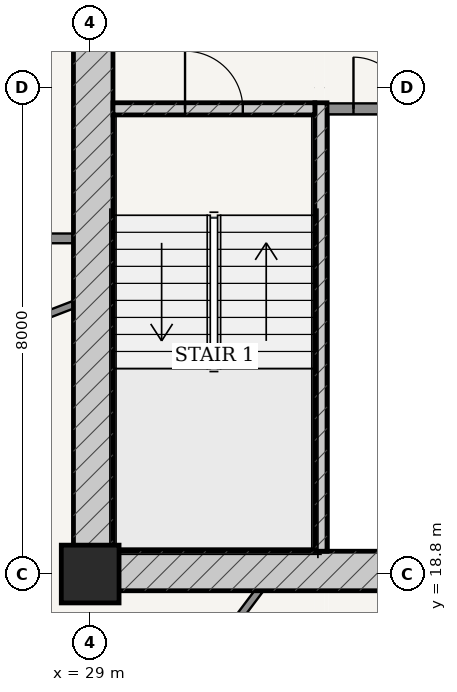
"""IFC4 building model, lengths in metres.
Left out: names, types, materials, properties, quantities, classifications, styles, units other than length and angle.
Written with IfcOpenShell. Run it as: python <this file> out.ifc"""

import sys

from ifc_helpers import new_model, si_unit, direction, frame, frame_2d, origin, origin_2d, place, context, subcontext, project, spatial, rectangle, extrude, source, transform, mapped, element, fill, save


model = new_model("IFC4")
c1 = context("Model", 3, precision=1e-05, world=origin(), true_north=direction((-0.2419218956, 0.970295726276)))
c2 = subcontext(c1, "Body", "Model", "MODEL_VIEW")
j1 = project(units=[si_unit("LENGTHUNIT", "METRE"), si_unit("PLANEANGLEUNIT", "RADIAN")], contexts=[c1])
p1 = place(None, origin())
s1 = spatial("IfcSite", under=j1, at=p1, CompositionType="ELEMENT")
p2 = place(p1, origin())
s2 = spatial("IfcBuilding", under=s1, at=p2, CompositionType="ELEMENT")
p3 = place(p2, frame((0.0, 0.0, 182.2)))
s3 = spatial("IfcBuildingStorey", under=s2, at=p3, CompositionType="ELEMENT", Elevation=182.2)
p4 = place(p3, frame((29.0, 18.8, 0.0), z_axis=(0.0, 0.0, 1.0), x_axis=(1.0, 0.0, 0.0)))
e1 = element("IfcColumn", 1, at=p4, inside=s3, PredefinedType="COLUMN", context=c2, shape_type="SweptSolid", body=[
    extrude(rectangle(XDim=0.95, YDim=0.95, at=origin_2d()), origin(), (0.0, 0.0, 1.0), 3.6),
])
p5 = place(p3, frame((28.725, 18.85, 0.0), z_axis=(0.0, 0.0, 1.0), x_axis=(1.0, 0.0, 0.0)))
e2 = element("IfcWall", 2, at=p5, inside=s3, PredefinedType="SHEAR", context=c2, shape_type="SweptSolid", body=[
    extrude(rectangle(XDim=18.55, YDim=0.65, at=frame_2d((9.275, 0.0))), origin(), (0.0, 0.0, 1.0), 3.15),
])
p6 = place(p5, frame((7.51, 0.0, 0.0)))
e3 = element("IfcOpeningElement", 3, at=p6, cuts=e2, PredefinedType="OPENING", context=c2, shape_type="SweptSolid", body=[
    extrude(rectangle(XDim=0.85, YDim=2.1, at=frame_2d((0.425, 1.05))), frame((0.0, 0.335, 0.0), z_axis=(0.0, -1.0, 0.0), x_axis=(1.0, 0.0, 0.0)), (0.0, 0.0, 1.0), 0.67),
])
p7 = place(p5, frame((10.59, 0.0, 0.0)))
e4 = element("IfcOpeningElement", 4, at=p7, cuts=e2, PredefinedType="OPENING", context=c2, shape_type="SweptSolid", body=[
    extrude(rectangle(XDim=0.85, YDim=2.1, at=frame_2d((0.425, 1.05))), frame((0.0, 0.335, 0.0), z_axis=(0.0, -1.0, 0.0), x_axis=(1.0, 0.0, 0.0)), (0.0, 0.0, 1.0), 0.67),
])
p8 = place(p3, frame((29.05, 19.175, 0.0), z_axis=(0.0, 0.0, 1.0), x_axis=(0.0, 1.0, 0.0)))
e5 = element("IfcWall", 5, at=p8, inside=s3, PredefinedType="SHEAR", context=c2, shape_type="SweptSolid", body=[
    extrude(rectangle(XDim=15.25, YDim=0.65, at=frame_2d((7.625, 0.0))), origin(), (0.0, 0.0, 1.0), 3.15),
])
p9 = place(p8, frame((9.875, 0.0, 0.0)))
e6 = element("IfcOpeningElement", 6, at=p9, cuts=e5, PredefinedType="OPENING", context=c2, shape_type="SweptSolid", body=[
    extrude(rectangle(XDim=1.5, YDim=2.2, at=frame_2d((0.75, 1.1))), frame((0.0, 0.335, 0.0), z_axis=(0.0, -1.0, 0.0), x_axis=(1.0, 0.0, 0.0)), (0.0, 0.0, 1.0), 0.67),
])
p10 = place(p3, frame((32.795, 19.175, 0.0), z_axis=(0.0, 0.0, 1.0), x_axis=(0.0, 1.0, 0.0)))
e7 = element("IfcWall", 7, at=p10, inside=s3, PredefinedType="SOLIDWALL", context=c2, shape_type="SweptSolid", body=[
    extrude(rectangle(XDim=7.375, YDim=0.2, at=frame_2d((3.688, 0.0))), origin(), (0.0, 0.0, 1.0), 3.15),
])
p11 = place(p3, frame((29.375, 26.45, 0.0), z_axis=(0.0, 0.0, 1.0), x_axis=(1.0, 0.0, 0.0)))
e8 = element("IfcWall", 8, at=p11, inside=s3, PredefinedType="SOLIDWALL", context=c2, shape_type="SweptSolid", body=[
    extrude(rectangle(XDim=3.32, YDim=0.2, at=frame_2d((1.66, 0.0))), origin(), (0.0, 0.0, 1.0), 3.15),
])
p12 = place(p11, frame((1.185, 0.0, 0.0)))
e9 = element("IfcOpeningElement", 9, at=p12, cuts=e8, PredefinedType="OPENING", context=c2, shape_type="SweptSolid", body=[
    extrude(rectangle(XDim=0.95, YDim=2.15, at=frame_2d((0.475, 1.075))), frame((0.0, 0.11, 0.0), z_axis=(0.0, -1.0, 0.0), x_axis=(1.0, 0.0, 0.0)), (0.0, 0.0, 1.0), 0.22),
])
p13 = place(p3, frame((32.9, 26.45, 0.0), z_axis=(0.0, 0.0, 1.0), x_axis=(1.0, 0.0, 0.0)))
e10 = element("IfcWall", 10, at=p13, inside=s3, PredefinedType="PARTITIONING", context=c2, shape_type="SweptSolid", body=[
    extrude(rectangle(XDim=1.71, YDim=0.18, at=frame_2d((0.855, 0.0))), origin(), (0.0, 0.0, 1.0), 3.15),
])
p14 = place(p13, frame((0.43, 0.0, 0.0)))
e11 = element("IfcOpeningElement", 11, at=p14, cuts=e10, PredefinedType="OPENING", context=c2, shape_type="SweptSolid", body=[
    extrude(rectangle(XDim=0.85, YDim=2.1, at=frame_2d((0.425, 1.05))), frame((0.0, 0.1, 0.0), z_axis=(0.0, -1.0, 0.0), x_axis=(1.0, 0.0, 0.0)), (0.0, 0.0, 1.0), 0.2),
])
p15 = place(p3, frame((26.795, 24.32, 0.0), z_axis=(0.0, 0.0, 1.0), x_axis=(1.0, 0.0, 0.0)))
e12 = element("IfcWall", 12, at=p15, inside=s3, PredefinedType="PARTITIONING", context=c2, shape_type="SweptSolid", body=[
    extrude(rectangle(XDim=1.93, YDim=0.16, at=frame_2d((0.965, 0.0))), origin(), (0.0, 0.0, 1.0), 3.15),
])
p16 = place(p3, frame((28.723, 23.229, 0.0), z_axis=(0.0, 0.0, 1.0), x_axis=(-0.933262385607, -0.359195378048, 0.0)))
e13 = element("IfcWall", 13, at=p16, inside=s3, PredefinedType="PARTITIONING", context=c2, shape_type="SweptSolid", body=[
    extrude(rectangle(XDim=5.219, YDim=0.12, at=frame_2d((2.609, 0.0))), origin(), (0.0, 0.0, 1.0), 2.825),
])
p17 = place(p16, frame((2.179, 0.0, 0.0)))
e14 = element("IfcOpeningElement", 14, at=p17, cuts=e13, PredefinedType="OPENING", context=c2, shape_type="SweptSolid", body=[
    extrude(rectangle(XDim=0.86, YDim=2.15, at=frame_2d((0.43, 1.075))), frame((0.0, 0.07, 0.0), z_axis=(0.0, -1.0, 0.0), x_axis=(1.0, 0.0, 0.0)), (0.0, 0.0, 1.0), 0.14),
])
p18 = place(p3, frame((31.777, 18.525, 0.0), z_axis=(0.0, 0.0, 1.0), x_axis=(-0.601054484551, -0.799208049635, 0.0)))
e15 = element("IfcWall", 15, at=p18, inside=s3, PredefinedType="PARTITIONING", context=c2, shape_type="SweptSolid", body=[
    extrude(rectangle(XDim=3.592, YDim=0.12, at=frame_2d((1.796, 0.0))), origin(), (0.0, 0.0, 1.0), 3.15),
])
p19 = place(p18, frame((1.346, 0.0, 0.0)))
e16 = element("IfcOpeningElement", 16, at=p19, cuts=e15, PredefinedType="OPENING", context=c2, shape_type="SweptSolid", body=[
    extrude(rectangle(XDim=0.9, YDim=2.15, at=frame_2d((0.45, 1.075))), frame((0.0, 0.07, 0.0), z_axis=(0.0, -1.0, 0.0), x_axis=(1.0, 0.0, 0.0)), (0.0, 0.0, 1.0), 0.14),
])
m1 = source(origin(), c2, "Body", "SweptSolid", [
    extrude(rectangle(XDim=0.95, YDim=2.15, at=frame_2d((0.475, 1.075))), frame((0.0, 0.025, 0.0), z_axis=(0.0, -1.0, 0.0), x_axis=(1.0, 0.0, 0.0)), (0.0, 0.0, 1.0), 0.05),
])
p20 = place(p12, origin())
e17 = element("IfcDoor", 17, at=p20, inside=s3, OperationType="SINGLE_SWING_LEFT", PredefinedType="DOOR", context=c2, shape_type="MappedRepresentation", body=[
    mapped(m1, transform((0.0, 0.0, 0.0), scale=1.0)),
])
fill(e9, e17)
m2 = source(origin(), c2, "Body", "SweptSolid", [
    extrude(rectangle(XDim=0.85, YDim=2.1, at=frame_2d((0.425, 1.05))), frame((0.0, 0.025, 0.0), z_axis=(0.0, -1.0, 0.0), x_axis=(1.0, 0.0, 0.0)), (0.0, 0.0, 1.0), 0.05),
])
p21 = place(p14, origin())
e18 = element("IfcDoor", 18, at=p21, inside=s3, OperationType="SINGLE_SWING_LEFT", PredefinedType="DOOR", context=c2, shape_type="MappedRepresentation", body=[
    mapped(m2, transform((0.0, 0.0, 0.0), scale=1.0)),
])
fill(e11, e18)
save(model, sys.argv[1])
